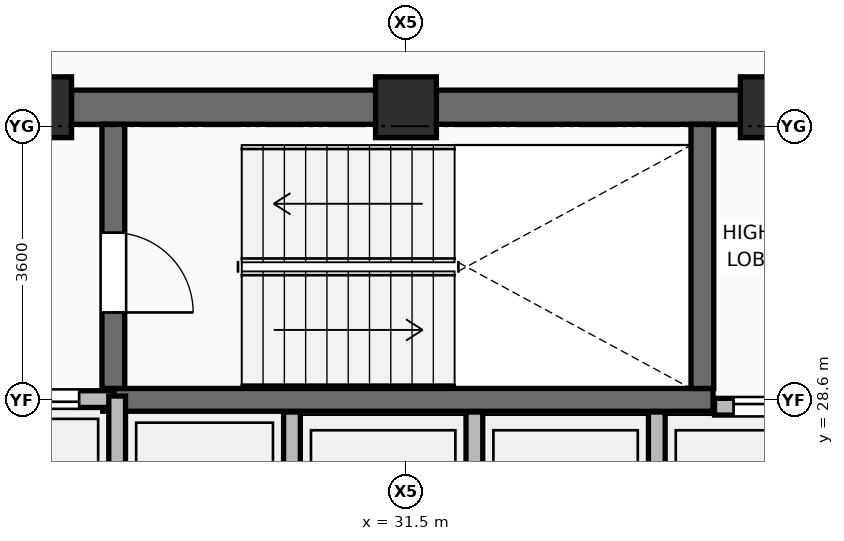
"""IFC4 building model, lengths in metres.
Left out: names, types, materials, properties, quantities, classifications, styles, units other than length and angle.
Written with IfcOpenShell. Run it as: python <this file> out.ifc"""

import sys

from ifc_helpers import new_model, si_unit, direction, frame, frame_2d, origin, origin_2d, place, context, subcontext, project, spatial, rectangle, extrude, element, fill, save


model = new_model("IFC4")
c1 = context("Model", 3, precision=1e-05, world=origin(), true_north=direction((0.0, 1.0)))
c2 = subcontext(c1, "Body", "Model", "MODEL_VIEW")
j1 = project(units=[si_unit("LENGTHUNIT", "METRE"), si_unit("PLANEANGLEUNIT", "RADIAN")], contexts=[c1])
p1 = place(None, origin())
s1 = spatial("IfcSite", under=j1, at=p1, CompositionType="ELEMENT")
p2 = place(p1, origin())
s2 = spatial("IfcBuilding", under=s1, at=p2, CompositionType="ELEMENT")
p3 = place(p2, frame((0.0, 0.0, 212.4)))
s3 = spatial("IfcBuildingStorey", under=s2, at=p3, CompositionType="ELEMENT", Elevation=212.4)
for number, where, z_axis, x_axis in (
    (1, (26.7, 32.45, 0.0), (0.0, 0.0, 1.0), (1.0, 0.0, 0.0)),
    (2, (31.5, 32.45, 0.0), (0.0, 0.0, 1.0), (1.0, 0.0, 0.0)),
    (3, (36.3, 32.45, 0.0), (0.0, 0.0, 1.0), (1.0, 0.0, 0.0)),
):
    element("IfcColumn", number, at=place(p3, frame(where, z_axis=z_axis, x_axis=x_axis)), inside=s3, PredefinedType="COLUMN", context=c2, shape_type="SweptSolid", body=[
        extrude(rectangle(XDim=0.8, YDim=0.8, at=origin_2d()), origin(), (0.0, 0.0, 1.0), 3.75),
    ])
p4 = place(p3, frame((30.0, 25.71, 0.0), z_axis=(0.0, 0.0, 1.0), x_axis=(0.0, 1.0, 0.0)))
e4 = element("IfcWall", 4, at=p4, inside=s3, PredefinedType="PARTITIONING", context=c2, shape_type="SweptSolid", body=[
    extrude(rectangle(XDim=2.73, YDim=0.22, at=frame_2d((1.365, 0.0))), origin(), (0.0, 0.0, 1.0), 3.545),
])
p5 = place(p3, frame((32.4, 26.2, 0.0), z_axis=(0.0, 0.0, 1.0), x_axis=(0.0, 1.0, 0.0)))
e5 = element("IfcWall", 5, at=p5, inside=s3, PredefinedType="PARTITIONING", context=c2, shape_type="SweptSolid", body=[
    extrude(rectangle(XDim=2.24, YDim=0.22, at=frame_2d((1.12, 0.0))), origin(), (0.0, 0.0, 1.0), 3.545),
])
p6 = place(p3, frame((34.8, 26.23, 0.0), z_axis=(0.0, 0.0, 1.0), x_axis=(0.0, 1.0, 0.0)))
e6 = element("IfcWall", 6, at=p6, inside=s3, PredefinedType="PARTITIONING", context=c2, shape_type="SweptSolid", body=[
    extrude(rectangle(XDim=2.21, YDim=0.22, at=frame_2d((1.105, 0.0))), origin(), (0.0, 0.0, 1.0), 3.545),
])
p7 = place(p3, frame((21.675, 32.45, 0.0), z_axis=(0.0, 0.0, 1.0), x_axis=(1.0, 0.0, 0.0)))
e7 = element("IfcWall", 7, at=p7, inside=s3, PredefinedType="SHEAR", context=c2, shape_type="SweptSolid", body=[
    extrude(rectangle(XDim=19.65, YDim=0.45, at=frame_2d((9.825, 0.0))), origin(), (0.0, 0.0, 1.0), 3.57),
])
p8 = place(p7, frame((2.075, 0.0, 0.0)))
e8 = element("IfcOpeningElement", 8, at=p8, cuts=e7, PredefinedType="OPENING", context=c2, shape_type="SweptSolid", body=[
    extrude(rectangle(XDim=1.1, YDim=2.1, at=frame_2d((0.55, 1.05))), frame((0.0, 0.235, 0.0), z_axis=(0.0, -1.0, 0.0), x_axis=(1.0, 0.0, 0.0)), (0.0, 0.0, 1.0), 0.47),
])
p9 = place(p7, frame((15.465, 0.0, 0.0)))
e9 = element("IfcOpeningElement", 9, at=p9, cuts=e7, PredefinedType="OPENING", context=c2, shape_type="SweptSolid", body=[
    extrude(rectangle(XDim=1.0, YDim=2.1, at=frame_2d((0.5, 1.05))), frame((0.0, 0.235, 0.0), z_axis=(0.0, -1.0, 0.0), x_axis=(1.0, 0.0, 0.0)), (0.0, 0.0, 1.0), 0.47),
])
p10 = place(p7, frame((17.475, 0.0, 0.0)))
e10 = element("IfcOpeningElement", 10, at=p10, cuts=e7, PredefinedType="OPENING", context=c2, shape_type="SweptSolid", body=[
    extrude(rectangle(XDim=0.9, YDim=2.1, at=frame_2d((0.45, 1.05))), frame((0.0, 0.235, 0.0), z_axis=(0.0, -1.0, 0.0), x_axis=(1.0, 0.0, 0.0)), (0.0, 0.0, 1.0), 0.47),
])
p11 = place(p3, frame((27.51, 28.6, 0.0), z_axis=(0.0, 0.0, 1.0), x_axis=(1.0, 0.0, 0.0)))
e11 = element("IfcWall", 11, at=p11, inside=s3, PredefinedType="SHEAR", context=c2, shape_type="SweptSolid", body=[
    extrude(rectangle(XDim=8.03, YDim=0.3, at=frame_2d((4.015, 0.0))), origin(), (0.0, 0.0, 1.0), 3.57),
])
p12 = place(p3, frame((27.65, 28.75, 0.0), z_axis=(0.0, 0.0, 1.0), x_axis=(0.0, 1.0, 0.0)))
e12 = element("IfcWall", 12, at=p12, inside=s3, PredefinedType="SHEAR", context=c2, shape_type="SweptSolid", body=[
    extrude(rectangle(XDim=3.475, YDim=0.3, at=frame_2d((1.738, 0.0))), origin(), (0.0, 0.0, 1.0), 3.57),
])
p13 = place(p12, frame((1.0, 0.0, 0.0)))
e13 = element("IfcOpeningElement", 13, at=p13, cuts=e12, PredefinedType="OPENING", context=c2, shape_type="SweptSolid", body=[
    extrude(rectangle(XDim=1.05, YDim=2.1, at=frame_2d((0.525, 1.05))), frame((0.0, 0.16, 0.0), z_axis=(0.0, -1.0, 0.0), x_axis=(1.0, 0.0, 0.0)), (0.0, 0.0, 1.0), 0.32),
])
p14 = place(p3, frame((35.4, 28.75, 0.0), z_axis=(0.0, 0.0, 1.0), x_axis=(0.0, 1.0, 0.0)))
e14 = element("IfcWall", 14, at=p14, inside=s3, PredefinedType="SHEAR", context=c2, shape_type="SweptSolid", body=[
    extrude(rectangle(XDim=3.475, YDim=0.3, at=frame_2d((1.738, 0.0))), origin(), (0.0, 0.0, 1.0), 3.57),
])
p15 = place(p3, frame((25.64, 28.61, 0.0), z_axis=(0.0, 0.0, 1.0), x_axis=(1.0, 0.0, 0.0)))
e15 = element("IfcWall", 15, at=p15, inside=s3, PredefinedType="PARTITIONING", context=c2, shape_type="SweptSolid", body=[
    extrude(rectangle(XDim=2.02, YDim=0.22, at=frame_2d((1.01, 0.0))), origin(), (0.0, 0.0, 1.0), 3.55),
])
p16 = place(p15, frame((0.46, 0.0, 0.0)))
e16 = element("IfcOpeningElement", 16, at=p16, cuts=e15, PredefinedType="OPENING", context=c2, shape_type="SweptSolid", body=[
    extrude(rectangle(XDim=1.1, YDim=2.2, at=frame_2d((0.55, 1.1))), frame((0.0, 0.12, 0.0), z_axis=(0.0, -1.0, 0.0), x_axis=(1.0, 0.0, 0.0)), (0.0, 0.0, 1.0), 0.24),
])
p17 = place(p3, frame((35.56, 28.51, 0.0), z_axis=(0.0, 0.0, 1.0), x_axis=(1.0, 0.0, 0.0)))
e17 = element("IfcWall", 17, at=p17, inside=s3, PredefinedType="PARTITIONING", context=c2, shape_type="SweptSolid", body=[
    extrude(rectangle(XDim=1.6, YDim=0.22, at=frame_2d((0.8, 0.0))), origin(), (0.0, 0.0, 1.0), 3.55),
])
p18 = place(p17, frame((0.25, 0.0, 0.0)))
e18 = element("IfcOpeningElement", 18, at=p18, cuts=e17, PredefinedType="OPENING", context=c2, shape_type="SweptSolid", body=[
    extrude(rectangle(XDim=1.1, YDim=2.2, at=frame_2d((0.55, 1.1))), frame((0.0, 0.12, 0.0), z_axis=(0.0, -1.0, 0.0), x_axis=(1.0, 0.0, 0.0)), (0.0, 0.0, 1.0), 0.24),
])
p19 = place(p3, frame((27.7, 25.65, 0.0), z_axis=(0.0, 0.0, 1.0), x_axis=(0.0, 1.0, 0.0)))
e19 = element("IfcWall", 19, at=p19, inside=s3, PredefinedType="PARTITIONING", context=c2, shape_type="SweptSolid", body=[
    extrude(rectangle(XDim=3.0, YDim=0.22, at=frame_2d((1.5, 0.0))), origin(), (0.0, 0.0, 1.0), 3.55),
])
p20 = place(p13, frame((1.05, 0.0, 0.0), z_axis=(0.0, 0.0, 1.0), x_axis=(-1.0, 0.0, 0.0)))
e20 = element("IfcDoor", 20, at=p20, inside=s3, OperationType="SINGLE_SWING_RIGHT", PredefinedType="DOOR", context=c2, shape_type="SweptSolid", body=[
    extrude(rectangle(XDim=1.05, YDim=2.1, at=frame_2d((0.525, 1.05))), frame((0.0, 0.025, 0.0), z_axis=(0.0, -1.0, 0.0), x_axis=(1.0, 0.0, 0.0)), (0.0, 0.0, 1.0), 0.05),
])
fill(e13, e20)
p21 = place(p16, origin())
e21 = element("IfcDoor", 21, at=p21, inside=s3, OperationType="DOUBLE_DOOR_SLIDING", PredefinedType="DOOR", context=c2, shape_type="SweptSolid", body=[
    extrude(rectangle(XDim=1.1, YDim=2.2, at=frame_2d((0.55, 1.1))), frame((0.0, 0.025, 0.0), z_axis=(0.0, -1.0, 0.0), x_axis=(1.0, 0.0, 0.0)), (0.0, 0.0, 1.0), 0.05),
])
fill(e16, e21)
p22 = place(p18, origin())
e22 = element("IfcDoor", 22, at=p22, inside=s3, OperationType="DOUBLE_DOOR_SLIDING", PredefinedType="DOOR", context=c2, shape_type="SweptSolid", body=[
    extrude(rectangle(XDim=1.1, YDim=2.2, at=frame_2d((0.55, 1.1))), frame((0.0, 0.025, 0.0), z_axis=(0.0, -1.0, 0.0), x_axis=(1.0, 0.0, 0.0)), (0.0, 0.0, 1.0), 0.05),
])
fill(e18, e22)
save(model, sys.argv[1])
